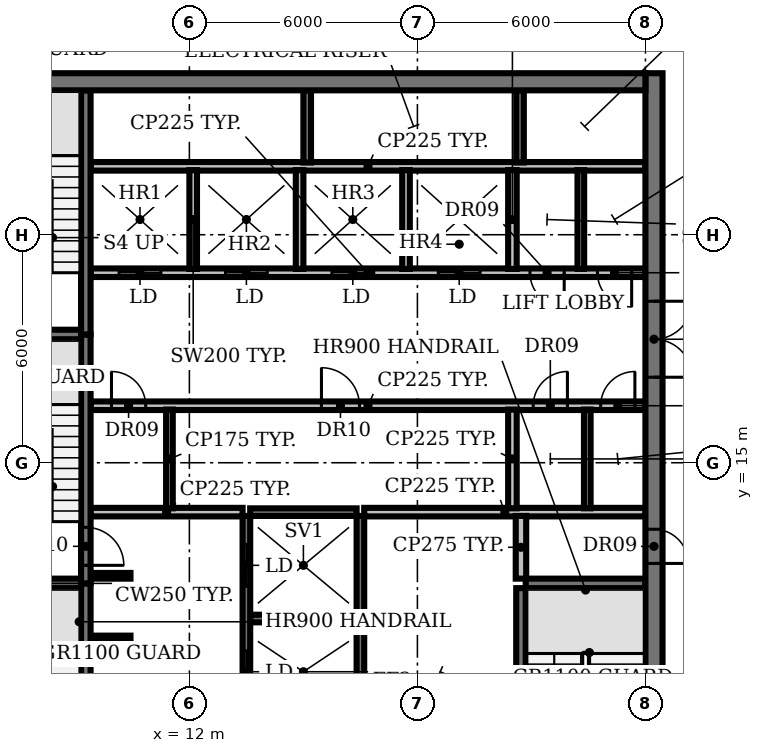
"""IFC4 building model, lengths in metres.
Left out: names, types, materials, properties, quantities, classifications, styles, units other than length and angle.
Written with IfcOpenShell. Run it as: python <this file> out.ifc"""

import sys

from ifc_helpers import new_model, si_unit, direction, frame, frame_2d, origin, place, context, subcontext, project, spatial, rectangle, extrude, element, fill, save


model = new_model("IFC4")
c1 = context("Model", 3, precision=1e-05, world=origin(), true_north=direction((0.0, 1.0)))
c2 = subcontext(c1, "Body", "Model", "MODEL_VIEW")
j1 = project(units=[si_unit("LENGTHUNIT", "METRE"), si_unit("PLANEANGLEUNIT", "RADIAN")], contexts=[c1])
p1 = place(None, origin())
s1 = spatial("IfcSite", under=j1, at=p1, CompositionType="ELEMENT")
p2 = place(p1, origin())
s2 = spatial("IfcBuilding", under=s1, at=p2, CompositionType="ELEMENT")
p3 = place(p2, frame((0.0, 0.0, 243.2)))
s3 = spatial("IfcBuildingStorey", under=s2, at=p3, CompositionType="ELEMENT", Elevation=243.2)
p4 = place(p3, frame((9.4, 10.375, 0.0), z_axis=(0.0, 0.0, 1.0), x_axis=(1.0, 0.0, 0.0)))
e1 = element("IfcWall", 1, at=p4, inside=s3, PredefinedType="SHEAR", context=c2, shape_type="SweptSolid", body=[
    extrude(rectangle(XDim=1.05, YDim=0.15, at=frame_2d((0.525, 0.0))), origin(), (0.0, 0.0, 1.0), 3.85),
])
p5 = place(p3, frame((13.6, 10.9, 0.0), z_axis=(0.0, 0.0, 1.0), x_axis=(1.0, 0.0, 0.0)))
e2 = element("IfcWall", 2, at=p5, inside=s3, PredefinedType="SHEAR", context=c2, shape_type="SweptSolid", body=[
    extrude(rectangle(XDim=2.8, YDim=0.2, at=frame_2d((1.4, 0.0))), origin(), (0.0, 0.0, 1.0), 3.85),
])
for number, where, z_axis, x_axis in (
    (3, (6.0, 11.825, 0.0), (0.0, 0.0, 1.0), (1.0, 0.0, 0.0)),
    (4, (20.85, 11.825, 0.0), (0.0, 0.0, 1.0), (1.0, 0.0, 0.0)),
):
    element("IfcWall", number, at=place(p3, frame(where, z_axis=z_axis, x_axis=x_axis)), inside=s3, PredefinedType="SHEAR", context=c2, shape_type="SweptSolid", body=[
        extrude(rectangle(XDim=3.15, YDim=0.25, at=frame_2d((1.575, 0.0))), origin(), (0.0, 0.0, 1.0), 3.85),
    ])
p6 = place(p3, frame((9.4, 12.025, 0.0), z_axis=(0.0, 0.0, 1.0), x_axis=(1.0, 0.0, 0.0)))
e5 = element("IfcWall", 5, at=p6, inside=s3, PredefinedType="SHEAR", context=c2, shape_type="SweptSolid", body=[
    extrude(rectangle(XDim=1.05, YDim=0.15, at=frame_2d((0.525, 0.0))), origin(), (0.0, 0.0, 1.0), 3.85),
])
p7 = place(p3, frame((9.4, 13.7, 0.0), z_axis=(0.0, 0.0, 1.0), x_axis=(1.0, 0.0, 0.0)))
e6 = element("IfcWall", 6, at=p7, inside=s3, PredefinedType="PARTITIONING", context=c2, shape_type="SweptSolid", body=[
    extrude(rectangle(XDim=4.0, YDim=0.225, at=frame_2d((2.0, 0.0))), origin(), (0.0, 0.0, 1.0), 3.85),
])
p8 = place(p3, frame((13.6, 13.7, 0.0), z_axis=(0.0, 0.0, 1.0), x_axis=(1.0, 0.0, 0.0)))
e7 = element("IfcWall", 7, at=p8, inside=s3, PredefinedType="SHEAR", context=c2, shape_type="SweptSolid", body=[
    extrude(rectangle(XDim=2.8, YDim=0.2, at=frame_2d((1.4, 0.0))), origin(), (0.0, 0.0, 1.0), 3.85),
])
p9 = place(p3, frame((16.6, 13.7, 0.0), z_axis=(0.0, 0.0, 1.0), x_axis=(1.0, 0.0, 0.0)))
e8 = element("IfcWall", 8, at=p9, inside=s3, PredefinedType="PARTITIONING", context=c2, shape_type="SweptSolid", body=[
    extrude(rectangle(XDim=7.4, YDim=0.225, at=frame_2d((3.7, 0.0))), origin(), (0.0, 0.0, 1.0), 3.85),
])
p10 = place(p3, frame((9.4, 16.5, 0.0), z_axis=(0.0, 0.0, 1.0), x_axis=(1.0, 0.0, 0.0)))
e9 = element("IfcWall", 9, at=p10, inside=s3, PredefinedType="PARTITIONING", context=c2, shape_type="SweptSolid", body=[
    extrude(rectangle(XDim=14.6, YDim=0.225, at=frame_2d((7.3, 0.0))), origin(), (0.0, 0.0, 1.0), 3.85),
])
p11 = place(p10, frame((0.55, 0.0, 0.0)))
e10 = element("IfcOpeningElement", 10, at=p11, cuts=e9, PredefinedType="OPENING", context=c2, shape_type="SweptSolid", body=[
    extrude(rectangle(XDim=0.9, YDim=2.1, at=frame_2d((0.45, 1.05))), frame((0.0, 0.123, 0.0), z_axis=(0.0, -1.0, 0.0), x_axis=(1.0, 0.0, 0.0)), (0.0, 0.0, 1.0), 0.245),
])
p12 = place(p10, frame((6.075, 0.0, 0.0)))
e11 = element("IfcOpeningElement", 11, at=p12, cuts=e9, PredefinedType="OPENING", context=c2, shape_type="SweptSolid", body=[
    extrude(rectangle(XDim=1.0, YDim=2.1, at=frame_2d((0.5, 1.05))), frame((0.0, 0.123, 0.0), z_axis=(0.0, -1.0, 0.0), x_axis=(1.0, 0.0, 0.0)), (0.0, 0.0, 1.0), 0.245),
])
p13 = place(p10, frame((11.647, 0.0, 0.0)))
e12 = element("IfcOpeningElement", 12, at=p13, cuts=e9, PredefinedType="OPENING", context=c2, shape_type="SweptSolid", body=[
    extrude(rectangle(XDim=0.9, YDim=2.1, at=frame_2d((0.45, 1.05))), frame((0.0, 0.123, 0.0), z_axis=(0.0, -1.0, 0.0), x_axis=(1.0, 0.0, 0.0)), (0.0, 0.0, 1.0), 0.245),
])
p14 = place(p10, frame((13.423, 0.0, 0.0)))
e13 = element("IfcOpeningElement", 13, at=p14, cuts=e9, PredefinedType="OPENING", context=c2, shape_type="SweptSolid", body=[
    extrude(rectangle(XDim=0.9, YDim=2.1, at=frame_2d((0.45, 1.05))), frame((0.0, 0.123, 0.0), z_axis=(0.0, -1.0, 0.0), x_axis=(1.0, 0.0, 0.0)), (0.0, 0.0, 1.0), 0.245),
])
p15 = place(p3, frame((6.0, 18.375, 0.0), z_axis=(0.0, 0.0, 1.0), x_axis=(1.0, 0.0, 0.0)))
e14 = element("IfcWall", 14, at=p15, inside=s3, PredefinedType="SHEAR", context=c2, shape_type="SweptSolid", body=[
    extrude(rectangle(XDim=3.15, YDim=0.25, at=frame_2d((1.575, 0.0))), origin(), (0.0, 0.0, 1.0), 3.85),
])
p16 = place(p3, frame((24.0, 20.0, 0.0), z_axis=(0.0, 0.0, 1.0), x_axis=(-1.0, 0.0, 0.0)))
e15 = element("IfcWall", 15, at=p16, inside=s3, PredefinedType="PARTITIONING", context=c2, shape_type="SweptSolid", body=[
    extrude(rectangle(XDim=14.6, YDim=0.225, at=frame_2d((7.3, 0.0))), origin(), (0.0, 0.0, 1.0), 3.85),
])
p17 = place(p16, frame((12.75, 0.0, 0.0)))
e16 = element("IfcOpeningElement", 16, at=p17, cuts=e15, PredefinedType="OPENING", context=c2, shape_type="SweptSolid", body=[
    extrude(rectangle(XDim=1.1, YDim=2.1, at=frame_2d((0.55, 1.05))), frame((0.0, 0.123, 0.0), z_axis=(0.0, -1.0, 0.0), x_axis=(1.0, 0.0, 0.0)), (0.0, 0.0, 1.0), 0.245),
])
p18 = place(p16, frame((9.95, 0.0, 0.0)))
e17 = element("IfcOpeningElement", 17, at=p18, cuts=e15, PredefinedType="OPENING", context=c2, shape_type="SweptSolid", body=[
    extrude(rectangle(XDim=1.1, YDim=2.1, at=frame_2d((0.55, 1.05))), frame((0.0, 0.123, 0.0), z_axis=(0.0, -1.0, 0.0), x_axis=(1.0, 0.0, 0.0)), (0.0, 0.0, 1.0), 0.245),
])
p19 = place(p16, frame((7.15, 0.0, 0.0)))
e18 = element("IfcOpeningElement", 18, at=p19, cuts=e15, PredefinedType="OPENING", context=c2, shape_type="SweptSolid", body=[
    extrude(rectangle(XDim=1.1, YDim=2.1, at=frame_2d((0.55, 1.05))), frame((0.0, 0.123, 0.0), z_axis=(0.0, -1.0, 0.0), x_axis=(1.0, 0.0, 0.0)), (0.0, 0.0, 1.0), 0.245),
])
p20 = place(p16, frame((4.35, 0.0, 0.0)))
e19 = element("IfcOpeningElement", 19, at=p20, cuts=e15, PredefinedType="OPENING", context=c2, shape_type="SweptSolid", body=[
    extrude(rectangle(XDim=1.1, YDim=2.1, at=frame_2d((0.55, 1.05))), frame((0.0, 0.123, 0.0), z_axis=(0.0, -1.0, 0.0), x_axis=(1.0, 0.0, 0.0)), (0.0, 0.0, 1.0), 0.245),
])
p21 = place(p16, frame((2.137, 0.0, 0.0)))
e20 = element("IfcOpeningElement", 20, at=p21, cuts=e15, PredefinedType="OPENING", context=c2, shape_type="SweptSolid", body=[
    extrude(rectangle(XDim=0.9, YDim=2.1, at=frame_2d((0.45, 1.05))), frame((0.0, 0.123, 0.0), z_axis=(0.0, -1.0, 0.0), x_axis=(1.0, 0.0, 0.0)), (0.0, 0.0, 1.0), 0.245),
])
p22 = place(p16, frame((0.363, 0.0, 0.0)))
e21 = element("IfcOpeningElement", 21, at=p22, cuts=e15, PredefinedType="OPENING", context=c2, shape_type="SweptSolid", body=[
    extrude(rectangle(XDim=0.9, YDim=2.1, at=frame_2d((0.45, 1.05))), frame((0.0, 0.123, 0.0), z_axis=(0.0, -1.0, 0.0), x_axis=(1.0, 0.0, 0.0)), (0.0, 0.0, 1.0), 0.245),
])
p23 = place(p3, frame((9.4, 22.8, 0.0), z_axis=(0.0, 0.0, 1.0), x_axis=(1.0, 0.0, 0.0)))
e22 = element("IfcWall", 22, at=p23, inside=s3, PredefinedType="PARTITIONING", context=c2, shape_type="SweptSolid", body=[
    extrude(rectangle(XDim=14.6, YDim=0.225, at=frame_2d((7.3, 0.0))), origin(), (0.0, 0.0, 1.0), 3.85),
])
p24 = place(p3, frame((9.275, 11.825, 0.0), z_axis=(0.0, 0.0, 1.0), x_axis=(0.0, -1.0, 0.0)))
e23 = element("IfcWall", 23, at=p24, inside=s3, PredefinedType="SHEAR", context=c2, shape_type="SweptSolid", body=[
    extrude(rectangle(XDim=6.425, YDim=0.25, at=frame_2d((3.212, 0.0))), origin(), (0.0, 0.0, 1.0), 3.85),
])
p25 = place(p24, frame((5.075, 0.0, 0.0)))
e24 = element("IfcOpeningElement", 24, at=p25, cuts=e23, PredefinedType="OPENING", context=c2, shape_type="SweptSolid", body=[
    extrude(rectangle(XDim=1.0, YDim=2.1, at=frame_2d((0.5, 1.05))), frame((0.0, 0.135, 0.0), z_axis=(0.0, -1.0, 0.0), x_axis=(1.0, 0.0, 0.0)), (0.0, 0.0, 1.0), 0.27),
])
p26 = place(p3, frame((9.275, 18.375, 0.0), z_axis=(0.0, 0.0, 1.0), x_axis=(0.0, -1.0, 0.0)))
e25 = element("IfcWall", 25, at=p26, inside=s3, PredefinedType="SHEAR", context=c2, shape_type="SweptSolid", body=[
    extrude(rectangle(XDim=6.55, YDim=0.25, at=frame_2d((3.275, 0.0))), origin(), (0.0, 0.0, 1.0), 3.85),
])
p27 = place(p26, frame((5.075, 0.0, 0.0)))
e26 = element("IfcOpeningElement", 26, at=p27, cuts=e25, PredefinedType="OPENING", context=c2, shape_type="SweptSolid", body=[
    extrude(rectangle(XDim=1.0, YDim=2.1, at=frame_2d((0.5, 1.05))), frame((0.0, 0.135, 0.0), z_axis=(0.0, -1.0, 0.0), x_axis=(1.0, 0.0, 0.0)), (0.0, 0.0, 1.0), 0.27),
])
p28 = place(p3, frame((9.275, 18.375, 0.0), z_axis=(0.0, 0.0, 1.0), x_axis=(0.0, 1.0, 0.0)))
e27 = element("IfcWall", 27, at=p28, inside=s3, PredefinedType="SHEAR", context=c2, shape_type="SweptSolid", body=[
    extrude(rectangle(XDim=6.425, YDim=0.25, at=frame_2d((3.212, 0.0))), origin(), (0.0, 0.0, 1.0), 3.85),
])
p29 = place(p3, frame((11.475, 13.8, 0.0), z_axis=(0.0, 0.0, 1.0), x_axis=(0.0, 1.0, 0.0)))
e28 = element("IfcWall", 28, at=p29, inside=s3, PredefinedType="PARTITIONING", context=c2, shape_type="SweptSolid", body=[
    extrude(rectangle(XDim=2.6, YDim=0.175, at=frame_2d((1.3, 0.0))), origin(), (0.0, 0.0, 1.0), 3.85),
])
p30 = place(p3, frame((12.1, 20.1, 0.0), z_axis=(0.0, 0.0, 1.0), x_axis=(0.0, 1.0, 0.0)))
e29 = element("IfcWall", 29, at=p30, inside=s3, PredefinedType="SOLIDWALL", context=c2, shape_type="SweptSolid", body=[
    extrude(rectangle(XDim=2.6, YDim=0.2, at=frame_2d((1.3, 0.0))), origin(), (0.0, 0.0, 1.0), 3.85),
])
p31 = place(p3, frame((13.5, 5.4, 0.0), z_axis=(0.0, 0.0, 1.0), x_axis=(0.0, 1.0, 0.0)))
e30 = element("IfcWall", 30, at=p31, inside=s3, PredefinedType="SHEAR", context=c2, shape_type="SweptSolid", body=[
    extrude(rectangle(XDim=8.2, YDim=0.2, at=frame_2d((4.1, 0.0))), origin(), (0.0, 0.0, 1.0), 3.85),
])
p32 = place(p31, frame((0.75, 0.0, 0.0)))
e31 = element("IfcOpeningElement", 31, at=p32, cuts=e30, PredefinedType="OPENING", context=c2, shape_type="SweptSolid", body=[
    extrude(rectangle(XDim=1.1, YDim=2.1, at=frame_2d((0.55, 1.05))), frame((0.0, 0.11, 0.0), z_axis=(0.0, -1.0, 0.0), x_axis=(1.0, 0.0, 0.0)), (0.0, 0.0, 1.0), 0.22),
])
p33 = place(p31, frame((3.55, 0.0, 0.0)))
e32 = element("IfcOpeningElement", 32, at=p33, cuts=e30, PredefinedType="OPENING", context=c2, shape_type="SweptSolid", body=[
    extrude(rectangle(XDim=1.1, YDim=2.1, at=frame_2d((0.55, 1.05))), frame((0.0, 0.11, 0.0), z_axis=(0.0, -1.0, 0.0), x_axis=(1.0, 0.0, 0.0)), (0.0, 0.0, 1.0), 0.22),
])
p34 = place(p31, frame((6.35, 0.0, 0.0)))
e33 = element("IfcOpeningElement", 33, at=p34, cuts=e30, PredefinedType="OPENING", context=c2, shape_type="SweptSolid", body=[
    extrude(rectangle(XDim=1.1, YDim=2.1, at=frame_2d((0.55, 1.05))), frame((0.0, 0.11, 0.0), z_axis=(0.0, -1.0, 0.0), x_axis=(1.0, 0.0, 0.0)), (0.0, 0.0, 1.0), 0.22),
])
p35 = place(p3, frame((14.9, 20.1, 0.0), z_axis=(0.0, 0.0, 1.0), x_axis=(0.0, 1.0, 0.0)))
e34 = element("IfcWall", 34, at=p35, inside=s3, PredefinedType="SOLIDWALL", context=c2, shape_type="SweptSolid", body=[
    extrude(rectangle(XDim=2.6, YDim=0.2, at=frame_2d((1.3, 0.0))), origin(), (0.0, 0.0, 1.0), 3.85),
])
p36 = place(p3, frame((15.1, 22.9, 0.0), z_axis=(0.0, 0.0, 1.0), x_axis=(0.0, 1.0, 0.0)))
e35 = element("IfcWall", 35, at=p36, inside=s3, PredefinedType="SHEAR", context=c2, shape_type="SweptSolid", body=[
    extrude(rectangle(XDim=1.9, YDim=0.2, at=frame_2d((0.95, 0.0))), origin(), (0.0, 0.0, 1.0), 3.85),
])
p37 = place(p3, frame((16.5, 5.4, 0.0), z_axis=(0.0, 0.0, 1.0), x_axis=(0.0, 1.0, 0.0)))
e36 = element("IfcWall", 36, at=p37, inside=s3, PredefinedType="SHEAR", context=c2, shape_type="SweptSolid", body=[
    extrude(rectangle(XDim=8.2, YDim=0.2, at=frame_2d((4.1, 0.0))), origin(), (0.0, 0.0, 1.0), 3.85),
])
p38 = place(p3, frame((17.7, 20.1, 0.0), z_axis=(0.0, 0.0, 1.0), x_axis=(0.0, 1.0, 0.0)))
e37 = element("IfcWall", 37, at=p38, inside=s3, PredefinedType="SOLIDWALL", context=c2, shape_type="SweptSolid", body=[
    extrude(rectangle(XDim=2.6, YDim=0.2, at=frame_2d((1.3, 0.0))), origin(), (0.0, 0.0, 1.0), 3.85),
])
for number, where, z_axis, x_axis in (
    (38, (20.5, 13.8, 0.0), (0.0, 0.0, 1.0), (0.0, 1.0, 0.0)),
    (39, (20.5, 20.1, 0.0), (0.0, 0.0, 1.0), (0.0, 1.0, 0.0)),
):
    element("IfcWall", number, at=place(p3, frame(where, z_axis=z_axis, x_axis=x_axis)), inside=s3, PredefinedType="PARTITIONING", context=c2, shape_type="SweptSolid", body=[
        extrude(rectangle(XDim=2.6, YDim=0.225, at=frame_2d((1.3, 0.0))), origin(), (0.0, 0.0, 1.0), 3.85),
    ])
p39 = place(p3, frame((20.7, 22.9, 0.0), z_axis=(0.0, 0.0, 1.0), x_axis=(0.0, 1.0, 0.0)))
e40 = element("IfcWall", 40, at=p39, inside=s3, PredefinedType="SHEAR", context=c2, shape_type="SweptSolid", body=[
    extrude(rectangle(XDim=1.9, YDim=0.2, at=frame_2d((0.95, 0.0))), origin(), (0.0, 0.0, 1.0), 3.85),
])
p40 = place(p3, frame((20.725, 5.4, 0.0), z_axis=(0.0, 0.0, 1.0), x_axis=(0.0, 1.0, 0.0)))
e41 = element("IfcWall", 41, at=p40, inside=s3, PredefinedType="SHEAR", context=c2, shape_type="SweptSolid", body=[
    extrude(rectangle(XDim=6.3, YDim=0.25, at=frame_2d((3.15, 0.0))), origin(), (0.0, 0.0, 1.0), 3.85),
])
p41 = place(p3, frame((20.725, 11.95, 0.0), z_axis=(0.0, 0.0, 1.0), x_axis=(0.0, 1.0, 0.0)))
e42 = element("IfcWall", 42, at=p41, inside=s3, PredefinedType="PARTITIONING", context=c2, shape_type="SweptSolid", body=[
    extrude(rectangle(XDim=1.65, YDim=0.275, at=frame_2d((0.825, 0.0))), origin(), (0.0, 0.0, 1.0), 3.85),
])
for number, where, z_axis, x_axis in (
    (43, (22.3, 20.1, 0.0), (0.0, 0.0, 1.0), (0.0, 1.0, 0.0)),
    (44, (22.47, 13.8, 0.0), (0.0, 0.0, 1.0), (0.0, 1.0, 0.0)),
):
    element("IfcWall", number, at=place(p3, frame(where, z_axis=z_axis, x_axis=x_axis)), inside=s3, PredefinedType="PARTITIONING", context=c2, shape_type="SweptSolid", body=[
        extrude(rectangle(XDim=2.6, YDim=0.175, at=frame_2d((1.3, 0.0))), origin(), (0.0, 0.0, 1.0), 3.85),
    ])
p42 = place(p3, frame((24.225, 25.25, 0.0), z_axis=(0.0, 0.0, 1.0), x_axis=(0.0, -1.0, 0.0)))
e45 = element("IfcWall", 45, at=p42, inside=s3, PredefinedType="SHEAR", context=c2, shape_type="SweptSolid", body=[
    extrude(rectangle(XDim=20.83, YDim=0.45, at=frame_2d((10.415, 0.0))), origin(), (0.0, 0.0, 1.0), 3.85),
])
p43 = place(p42, frame((18.1, 0.0, 0.0)))
e46 = element("IfcOpeningElement", 46, at=p43, cuts=e45, PredefinedType="OPENING", context=c2, shape_type="SweptSolid", body=[
    extrude(rectangle(XDim=1.5, YDim=2.1, at=frame_2d((0.75, 1.05))), frame((0.0, 0.235, 0.0), z_axis=(0.0, -1.0, 0.0), x_axis=(1.0, 0.0, 0.0)), (0.0, 0.0, 1.0), 0.47),
])
p44 = place(p42, frame((12.0, 0.0, 0.0)))
e47 = element("IfcOpeningElement", 47, at=p44, cuts=e45, PredefinedType="OPENING", context=c2, shape_type="SweptSolid", body=[
    extrude(rectangle(XDim=0.9, YDim=2.1, at=frame_2d((0.45, 1.05))), frame((0.0, 0.235, 0.0), z_axis=(0.0, -1.0, 0.0), x_axis=(1.0, 0.0, 0.0)), (0.0, 0.0, 1.0), 0.47),
])
p45 = place(p42, frame((6.0, 0.0, 0.0)))
e48 = element("IfcOpeningElement", 48, at=p45, cuts=e45, PredefinedType="OPENING", context=c2, shape_type="SweptSolid", body=[
    extrude(rectangle(XDim=2.0, YDim=2.1, at=frame_2d((1.0, 1.05))), frame((0.0, 0.235, 0.0), z_axis=(0.0, -1.0, 0.0), x_axis=(1.0, 0.0, 0.0)), (0.0, 0.0, 1.0), 0.47),
])
p46 = place(p3, frame((6.0, 25.025, 0.0), z_axis=(0.0, 0.0, 1.0), x_axis=(1.0, 0.0, 0.0)))
e49 = element("IfcWall", 49, at=p46, inside=s3, PredefinedType="SHEAR", context=c2, shape_type="SweptSolid", body=[
    extrude(rectangle(XDim=18.0, YDim=0.45, at=frame_2d((9.0, 0.0))), origin(), (0.0, 0.0, 1.0), 3.85),
])
p47 = place(p11, origin())
e50 = element("IfcDoor", 50, at=p47, inside=s3, OperationType="SINGLE_SWING_LEFT", PredefinedType="DOOR", context=c2, shape_type="SweptSolid", body=[
    extrude(rectangle(XDim=0.9, YDim=2.1, at=frame_2d((0.45, 1.05))), frame((0.0, 0.025, 0.0), z_axis=(0.0, -1.0, 0.0), x_axis=(1.0, 0.0, 0.0)), (0.0, 0.0, 1.0), 0.05),
])
fill(e10, e50)
p48 = place(p12, origin())
e51 = element("IfcDoor", 51, at=p48, inside=s3, OperationType="SINGLE_SWING_LEFT", PredefinedType="DOOR", context=c2, shape_type="SweptSolid", body=[
    extrude(rectangle(XDim=1.0, YDim=2.1, at=frame_2d((0.5, 1.05))), frame((0.0, 0.025, 0.0), z_axis=(0.0, -1.0, 0.0), x_axis=(1.0, 0.0, 0.0)), (0.0, 0.0, 1.0), 0.05),
])
fill(e11, e51)
p49 = place(p13, origin())
e52 = element("IfcDoor", 52, at=p49, inside=s3, OperationType="SINGLE_SWING_RIGHT", PredefinedType="DOOR", context=c2, shape_type="SweptSolid", body=[
    extrude(rectangle(XDim=0.9, YDim=2.1, at=frame_2d((0.45, 1.05))), frame((0.0, 0.025, 0.0), z_axis=(0.0, -1.0, 0.0), x_axis=(1.0, 0.0, 0.0)), (0.0, 0.0, 1.0), 0.05),
])
fill(e12, e52)
p50 = place(p14, origin())
e53 = element("IfcDoor", 53, at=p50, inside=s3, OperationType="SINGLE_SWING_RIGHT", PredefinedType="DOOR", context=c2, shape_type="SweptSolid", body=[
    extrude(rectangle(XDim=0.9, YDim=2.1, at=frame_2d((0.45, 1.05))), frame((0.0, 0.025, 0.0), z_axis=(0.0, -1.0, 0.0), x_axis=(1.0, 0.0, 0.0)), (0.0, 0.0, 1.0), 0.05),
])
fill(e13, e53)
p51 = place(p17, origin())
e54 = element("IfcDoor", 54, at=p51, inside=s3, OperationType="DOUBLE_DOOR_SLIDING", PredefinedType="DOOR", context=c2, shape_type="SweptSolid", body=[
    extrude(rectangle(XDim=1.1, YDim=2.1, at=frame_2d((0.55, 1.05))), frame((0.0, 0.025, 0.0), z_axis=(0.0, -1.0, 0.0), x_axis=(1.0, 0.0, 0.0)), (0.0, 0.0, 1.0), 0.05),
])
fill(e16, e54)
p52 = place(p18, origin())
e55 = element("IfcDoor", 55, at=p52, inside=s3, OperationType="DOUBLE_DOOR_SLIDING", PredefinedType="DOOR", context=c2, shape_type="SweptSolid", body=[
    extrude(rectangle(XDim=1.1, YDim=2.1, at=frame_2d((0.55, 1.05))), frame((0.0, 0.025, 0.0), z_axis=(0.0, -1.0, 0.0), x_axis=(1.0, 0.0, 0.0)), (0.0, 0.0, 1.0), 0.05),
])
fill(e17, e55)
p53 = place(p19, origin())
e56 = element("IfcDoor", 56, at=p53, inside=s3, OperationType="DOUBLE_DOOR_SLIDING", PredefinedType="DOOR", context=c2, shape_type="SweptSolid", body=[
    extrude(rectangle(XDim=1.1, YDim=2.1, at=frame_2d((0.55, 1.05))), frame((0.0, 0.025, 0.0), z_axis=(0.0, -1.0, 0.0), x_axis=(1.0, 0.0, 0.0)), (0.0, 0.0, 1.0), 0.05),
])
fill(e18, e56)
p54 = place(p20, origin())
e57 = element("IfcDoor", 57, at=p54, inside=s3, OperationType="DOUBLE_DOOR_SLIDING", PredefinedType="DOOR", context=c2, shape_type="SweptSolid", body=[
    extrude(rectangle(XDim=1.1, YDim=2.1, at=frame_2d((0.55, 1.05))), frame((0.0, 0.025, 0.0), z_axis=(0.0, -1.0, 0.0), x_axis=(1.0, 0.0, 0.0)), (0.0, 0.0, 1.0), 0.05),
])
fill(e19, e57)
p55 = place(p21, origin())
e58 = element("IfcDoor", 58, at=p55, inside=s3, OperationType="SINGLE_SWING_LEFT", PredefinedType="DOOR", context=c2, shape_type="SweptSolid", body=[
    extrude(rectangle(XDim=0.9, YDim=2.1, at=frame_2d((0.45, 1.05))), frame((0.0, 0.025, 0.0), z_axis=(0.0, -1.0, 0.0), x_axis=(1.0, 0.0, 0.0)), (0.0, 0.0, 1.0), 0.05),
])
fill(e20, e58)
p56 = place(p22, origin())
e59 = element("IfcDoor", 59, at=p56, inside=s3, OperationType="SINGLE_SWING_LEFT", PredefinedType="DOOR", context=c2, shape_type="SweptSolid", body=[
    extrude(rectangle(XDim=0.9, YDim=2.1, at=frame_2d((0.45, 1.05))), frame((0.0, 0.025, 0.0), z_axis=(0.0, -1.0, 0.0), x_axis=(1.0, 0.0, 0.0)), (0.0, 0.0, 1.0), 0.05),
])
fill(e21, e59)
p57 = place(p27, origin())
e60 = element("IfcDoor", 60, at=p57, inside=s3, OperationType="SINGLE_SWING_RIGHT", PredefinedType="DOOR", context=c2, shape_type="SweptSolid", body=[
    extrude(rectangle(XDim=1.0, YDim=2.1, at=frame_2d((0.5, 1.05))), frame((0.0, 0.025, 0.0), z_axis=(0.0, -1.0, 0.0), x_axis=(1.0, 0.0, 0.0)), (0.0, 0.0, 1.0), 0.05),
])
fill(e26, e60)
p58 = place(p33, origin())
e61 = element("IfcDoor", 61, at=p58, inside=s3, OperationType="DOUBLE_DOOR_SLIDING", PredefinedType="DOOR", context=c2, shape_type="SweptSolid", body=[
    extrude(rectangle(XDim=1.1, YDim=2.1, at=frame_2d((0.55, 1.05))), frame((0.0, 0.025, 0.0), z_axis=(0.0, -1.0, 0.0), x_axis=(1.0, 0.0, 0.0)), (0.0, 0.0, 1.0), 0.05),
])
fill(e32, e61)
p59 = place(p34, origin())
e62 = element("IfcDoor", 62, at=p59, inside=s3, OperationType="DOUBLE_DOOR_SLIDING", PredefinedType="DOOR", context=c2, shape_type="SweptSolid", body=[
    extrude(rectangle(XDim=1.1, YDim=2.1, at=frame_2d((0.55, 1.05))), frame((0.0, 0.025, 0.0), z_axis=(0.0, -1.0, 0.0), x_axis=(1.0, 0.0, 0.0)), (0.0, 0.0, 1.0), 0.05),
])
fill(e33, e62)
p60 = place(p44, origin())
e63 = element("IfcDoor", 63, at=p60, inside=s3, OperationType="SINGLE_SWING_RIGHT", PredefinedType="DOOR", context=c2, shape_type="SweptSolid", body=[
    extrude(rectangle(XDim=0.9, YDim=2.1, at=frame_2d((0.45, 1.05))), frame((0.0, 0.025, 0.0), z_axis=(0.0, -1.0, 0.0), x_axis=(1.0, 0.0, 0.0)), (0.0, 0.0, 1.0), 0.05),
])
fill(e47, e63)
p61 = place(p45, origin())
e64 = element("IfcDoor", 64, at=p61, inside=s3, OperationType="DOUBLE_DOOR_SINGLE_SWING", PredefinedType="DOOR", context=c2, shape_type="SweptSolid", body=[
    extrude(rectangle(XDim=2.0, YDim=2.1, at=frame_2d((1.0, 1.05))), frame((0.0, 0.025, 0.0), z_axis=(0.0, -1.0, 0.0), x_axis=(1.0, 0.0, 0.0)), (0.0, 0.0, 1.0), 0.05),
])
fill(e48, e64)
save(model, sys.argv[1])
